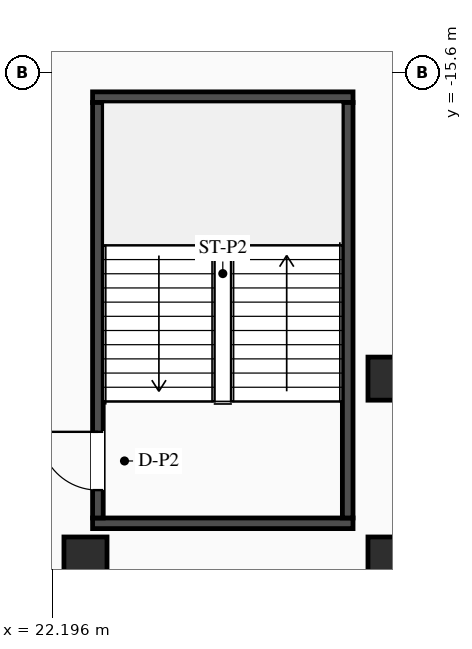
"""IFC4 building model, lengths in metres.
Left out: names, types, materials, properties, quantities, classifications, styles, units other than length and angle.
Written with IfcOpenShell. Run it as: python <this file> out.ifc"""

import sys

from ifc_helpers import new_model, si_unit, direction, frame, frame_2d, origin, origin_2d, place, context, subcontext, project, spatial, rectangle, i_section, extrude, element, fill, save


model = new_model("IFC4")
c1 = context("Model", 3, precision=1e-05, world=origin(), true_north=direction((0.0, 1.0)))
c2 = subcontext(c1, "Body", "Model", "MODEL_VIEW")
j1 = project(units=[si_unit("LENGTHUNIT", "METRE"), si_unit("PLANEANGLEUNIT", "RADIAN")], contexts=[c1])
p1 = place(None, origin())
s1 = spatial("IfcSite", under=j1, at=p1, CompositionType="ELEMENT")
p2 = place(p1, origin())
s2 = spatial("IfcBuilding", under=s1, at=p2, CompositionType="ELEMENT")
p3 = place(p2, frame((0.0, 0.0, 18.6)))
s3 = spatial("IfcBuildingStorey", under=s2, at=p3, CompositionType="ELEMENT", Elevation=18.6)
for number, where, z_axis, x_axis in (
    (1, (22.99, -24.505, 0.0), (0.0, 0.0, 1.0), (1.0, 0.0, 0.0)),
    (2, (22.99, -16.095, 0.0), (0.0, 0.0, 1.0), (1.0, 0.0, 0.0)),
):
    element("IfcWall", number, at=place(p3, frame(where, z_axis=z_axis, x_axis=x_axis)), inside=s3, PredefinedType="SHEAR", context=c2, shape_type="SweptSolid", body=[
        extrude(rectangle(XDim=5.14, YDim=0.21, at=frame_2d((2.57, 0.0))), origin(), (0.0, 0.0, 1.0), 3.95),
    ])
p4 = place(p3, frame((23.095, -24.4, 0.0), z_axis=(0.0, 0.0, 1.0), x_axis=(0.0, 1.0, 0.0)))
e3 = element("IfcWall", 3, at=p4, inside=s3, PredefinedType="SHEAR", context=c2, shape_type="SweptSolid", body=[
    extrude(rectangle(XDim=8.2, YDim=0.21, at=frame_2d((4.1, 0.0))), origin(), (0.0, 0.0, 1.0), 3.95),
])
p5 = place(p4, frame((0.55, 0.0, 0.0)))
e4 = element("IfcOpeningElement", 4, at=p5, cuts=e3, PredefinedType="OPENING", context=c2, shape_type="SweptSolid", body=[
    extrude(rectangle(XDim=1.15, YDim=2.1, at=frame_2d((0.575, 1.05))), frame((0.0, 0.115, 0.0), z_axis=(0.0, -1.0, 0.0), x_axis=(1.0, 0.0, 0.0)), (0.0, 0.0, 1.0), 0.23),
])
p6 = place(p3, frame((28.025, -24.4, 0.0), z_axis=(0.0, 0.0, 1.0), x_axis=(0.0, 1.0, 0.0)))
e5 = element("IfcWall", 5, at=p6, inside=s3, PredefinedType="SHEAR", context=c2, shape_type="SweptSolid", body=[
    extrude(rectangle(XDim=8.2, YDim=0.21, at=frame_2d((4.1, 0.0))), origin(), (0.0, 0.0, 1.0), 3.95),
])
for number, where, z_axis, x_axis in (
    (6, (28.85, -21.65, 0.0), (0.0, 0.0, 1.0), (1.0, 0.0, 0.0)),
    (7, (22.85, -25.2, 0.0), (0.0, 0.0, 1.0), (1.0, 0.0, 0.0)),
    (8, (28.85, -25.2, 0.0), (0.0, 0.0, 1.0), (1.0, 0.0, 0.0)),
):
    element("IfcColumn", number, at=place(p3, frame(where, z_axis=z_axis, x_axis=x_axis)), inside=s3, PredefinedType="COLUMN", context=c2, shape_type="SweptSolid", body=[
        extrude(i_section(OverallWidth=0.85, OverallDepth=0.85, WebThickness=0.032, FlangeThickness=0.048, at=origin_2d()), origin(), (0.0, 0.0, 1.0), 4.2),
    ])
p7 = place(p5, origin())
e9 = element("IfcDoor", 9, at=p7, inside=s3, OperationType="SINGLE_SWING_RIGHT", PredefinedType="DOOR", context=c2, shape_type="SweptSolid", body=[
    extrude(rectangle(XDim=1.15, YDim=2.1, at=frame_2d((0.575, 1.05))), frame((0.0, 0.025, 0.0), z_axis=(0.0, -1.0, 0.0), x_axis=(1.0, 0.0, 0.0)), (0.0, 0.0, 1.0), 0.05),
])
fill(e4, e9)
save(model, sys.argv[1])
